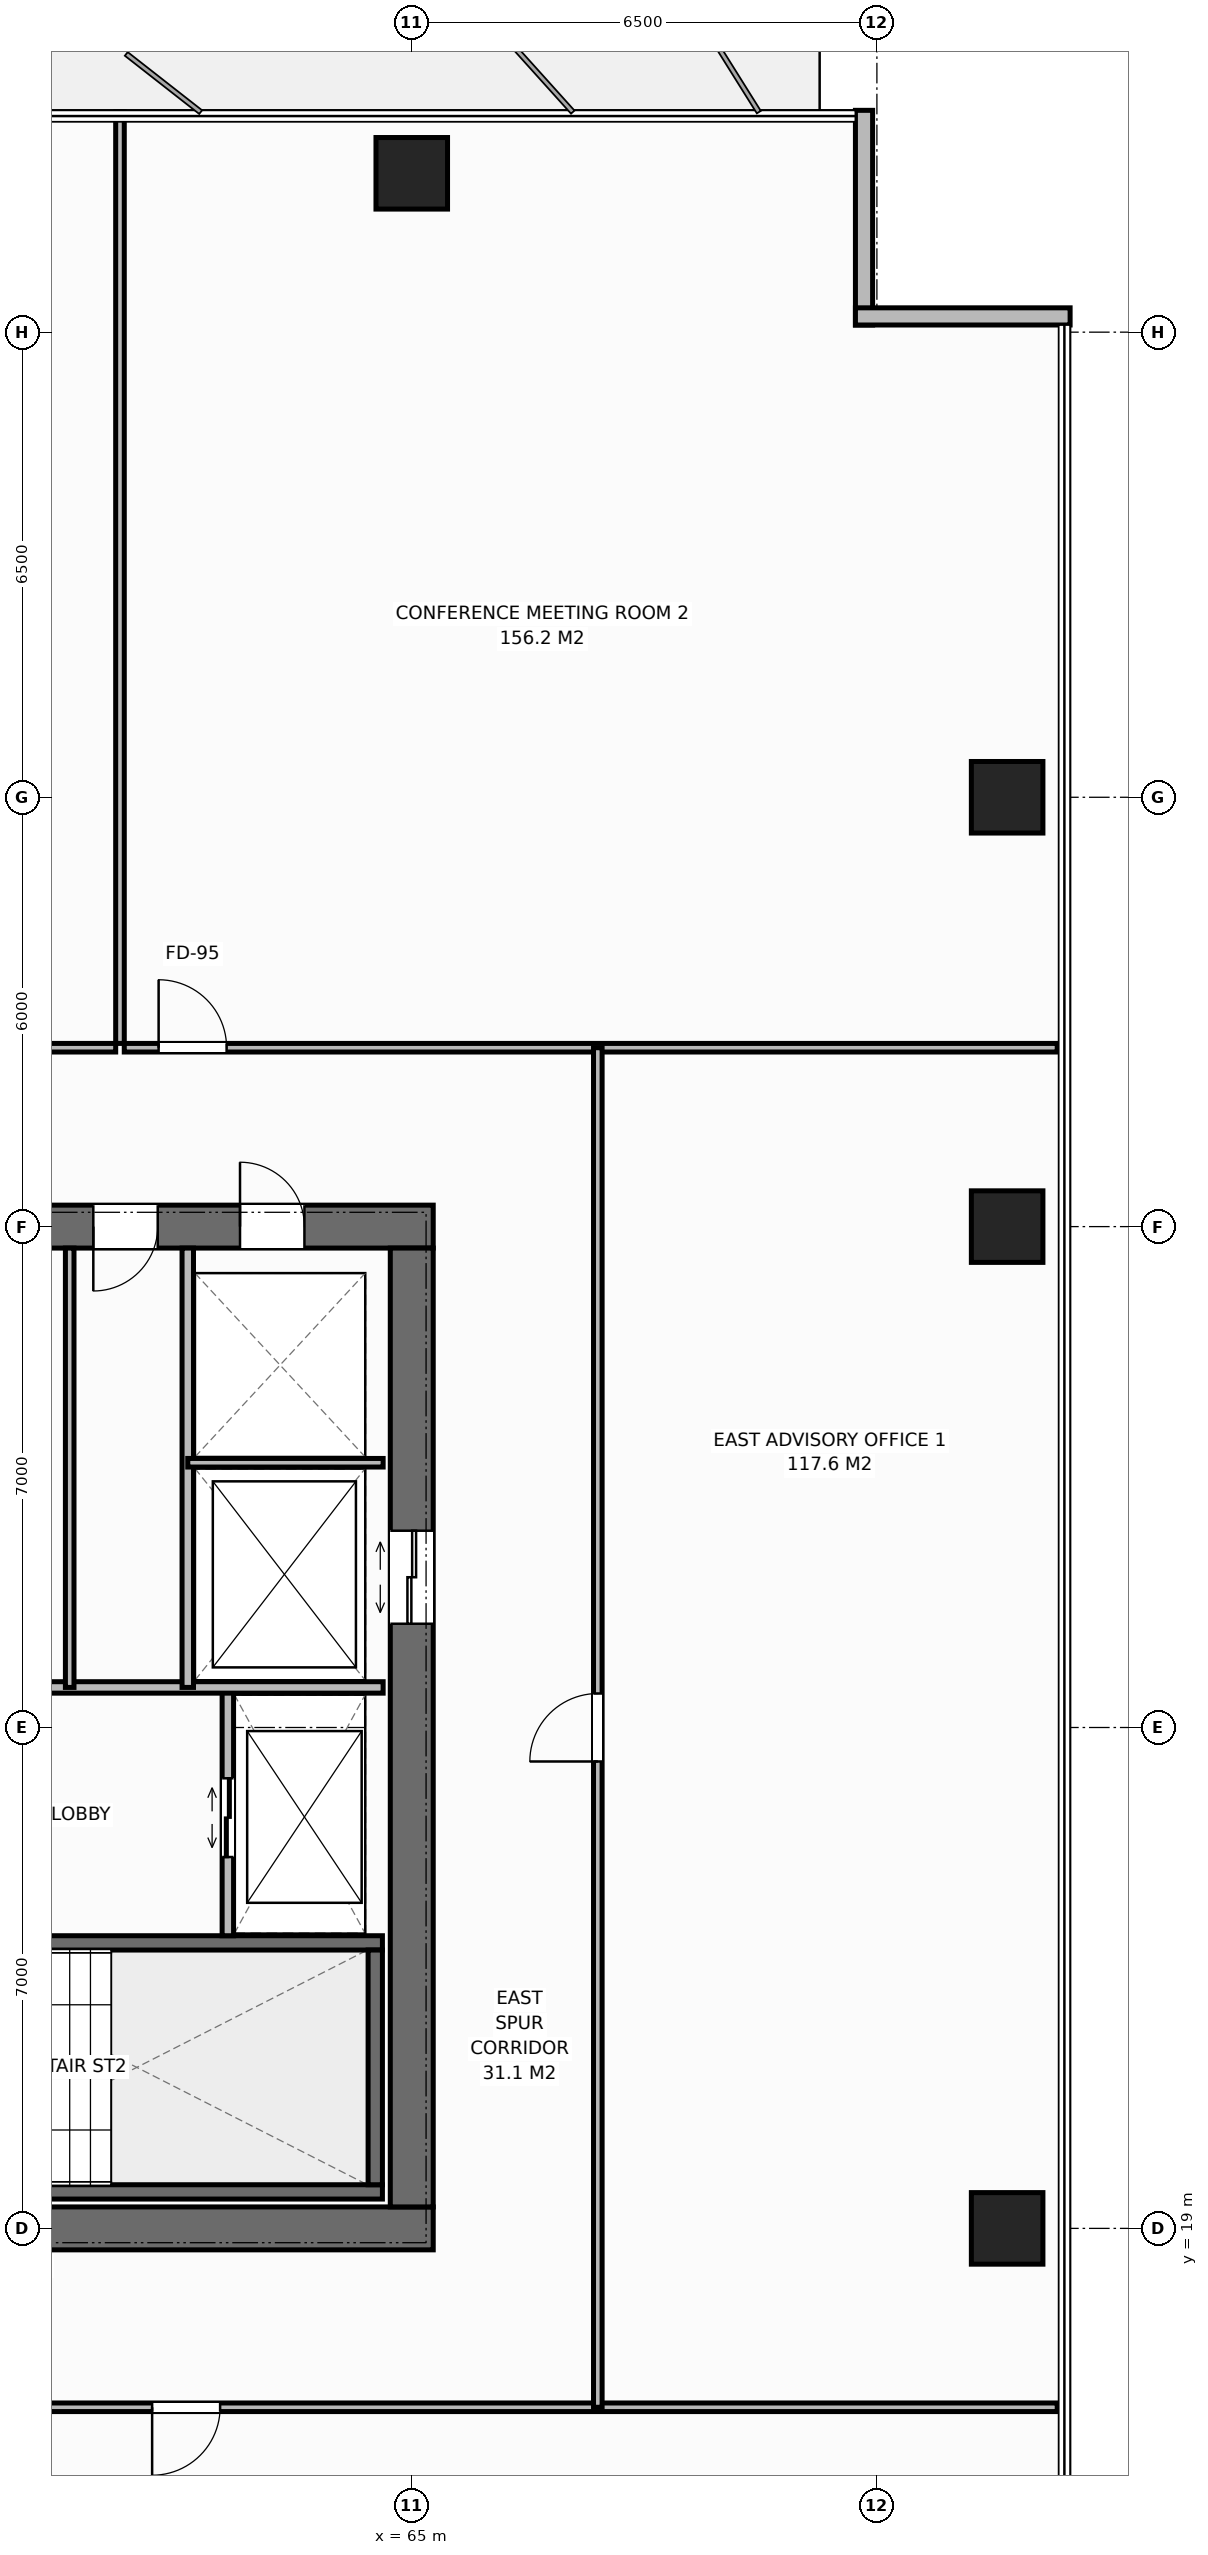
"""IFC4 building model, lengths in metres.
Left out: names, types, materials, properties, quantities, classifications, styles, units other than length and angle.
Written with IfcOpenShell. Run it as: python <this file> out.ifc"""

import sys

from ifc_helpers import new_model, si_unit, direction, frame, frame_2d, origin, origin_2d, place, context, subcontext, project, spatial, rectangle, extrude, element, fill, save


model = new_model("IFC4")
c1 = context("Model", 3, precision=1e-05, world=origin(), true_north=direction((0.0, 1.0)))
c2 = subcontext(c1, "Body", "Model", "MODEL_VIEW")
j1 = project(units=[si_unit("LENGTHUNIT", "METRE"), si_unit("PLANEANGLEUNIT", "RADIAN")], contexts=[c1])
p1 = place(None, origin())
s1 = spatial("IfcSite", under=j1, at=p1, CompositionType="ELEMENT")
p2 = place(p1, origin())
s2 = spatial("IfcBuilding", under=s1, at=p2, CompositionType="ELEMENT")
p3 = place(p2, frame((0.0, 0.0, 144.2)))
s3 = spatial("IfcBuildingStorey", under=s2, at=p3, CompositionType="ELEMENT", Elevation=144.2)
p4 = place(p3, frame((51.7, 19.0, 0.0), z_axis=(0.0, 0.0, 1.0), x_axis=(1.0, 0.0, 0.0)))
e1 = element("IfcWall", 1, at=p4, inside=s3, PredefinedType="SHEAR", context=c2, shape_type="SweptSolid", body=[
    extrude(rectangle(XDim=13.6, YDim=0.6, at=frame_2d((6.8, 0.0))), origin(), (0.0, 0.0, 1.0), 3.8),
])
p5 = place(p4, frame((3.02, 0.0, 0.0)))
e2 = element("IfcOpeningElement", 2, at=p5, cuts=e1, PredefinedType="OPENING", context=c2, shape_type="SweptSolid", body=[
    extrude(rectangle(XDim=1.4, YDim=2.2, at=frame_2d((0.7, 1.1))), frame((0.0, 0.31, 0.0), z_axis=(0.0, -1.0, 0.0), x_axis=(1.0, 0.0, 0.0)), (0.0, 0.0, 1.0), 0.62),
])
p6 = place(p3, frame((51.7, 33.0, 0.0), z_axis=(0.0, 0.0, 1.0), x_axis=(1.0, 0.0, 0.0)))
e3 = element("IfcWall", 3, at=p6, inside=s3, PredefinedType="SHEAR", context=c2, shape_type="SweptSolid", body=[
    extrude(rectangle(XDim=13.6, YDim=0.6, at=frame_2d((6.8, 0.0))), origin(), (0.0, 0.0, 1.0), 3.8),
])
p7 = place(p6, frame((3.02, 0.0, 0.0)))
e4 = element("IfcOpeningElement", 4, at=p7, cuts=e3, PredefinedType="OPENING", context=c2, shape_type="SweptSolid", body=[
    extrude(rectangle(XDim=1.4, YDim=2.2, at=frame_2d((0.7, 1.1))), frame((0.0, 0.31, 0.0), z_axis=(0.0, -1.0, 0.0), x_axis=(1.0, 0.0, 0.0)), (0.0, 0.0, 1.0), 0.62),
])
p8 = place(p6, frame((10.9, 0.0, 0.0)))
e5 = element("IfcOpeningElement", 5, at=p8, cuts=e3, PredefinedType="OPENING", context=c2, shape_type="SweptSolid", body=[
    extrude(rectangle(XDim=0.9, YDim=2.15, at=frame_2d((0.45, 1.075))), frame((0.0, 0.31, 0.0), z_axis=(0.0, -1.0, 0.0), x_axis=(1.0, 0.0, 0.0)), (0.0, 0.0, 1.0), 0.62),
])
p9 = place(p6, frame((5.65, 0.0, 0.0)))
e6 = element("IfcOpeningElement", 6, at=p9, cuts=e3, PredefinedType="OPENING", context=c2, shape_type="SweptSolid", body=[
    extrude(rectangle(XDim=0.9, YDim=2.15, at=frame_2d((0.45, 1.075))), frame((0.0, 0.31, 0.0), z_axis=(0.0, -1.0, 0.0), x_axis=(1.0, 0.0, 0.0)), (0.0, 0.0, 1.0), 0.62),
])
p10 = place(p6, frame((7.25, 0.0, 0.0)))
e7 = element("IfcOpeningElement", 7, at=p10, cuts=e3, PredefinedType="OPENING", context=c2, shape_type="SweptSolid", body=[
    extrude(rectangle(XDim=0.9, YDim=2.15, at=frame_2d((0.45, 1.075))), frame((0.0, 0.31, 0.0), z_axis=(0.0, -1.0, 0.0), x_axis=(1.0, 0.0, 0.0)), (0.0, 0.0, 1.0), 0.62),
])
p11 = place(p6, frame((8.85, 0.0, 0.0)))
e8 = element("IfcOpeningElement", 8, at=p11, cuts=e3, PredefinedType="OPENING", context=c2, shape_type="SweptSolid", body=[
    extrude(rectangle(XDim=0.9, YDim=2.15, at=frame_2d((0.45, 1.075))), frame((0.0, 0.31, 0.0), z_axis=(0.0, -1.0, 0.0), x_axis=(1.0, 0.0, 0.0)), (0.0, 0.0, 1.0), 0.62),
])
p12 = place(p3, frame((65.0, 19.3, 0.0), z_axis=(0.0, 0.0, 1.0), x_axis=(0.0, 1.0, 0.0)))
e9 = element("IfcWall", 9, at=p12, inside=s3, PredefinedType="SHEAR", context=c2, shape_type="SweptSolid", body=[
    extrude(rectangle(XDim=13.4, YDim=0.6, at=frame_2d((6.7, 0.0))), origin(), (0.0, 0.0, 1.0), 3.8),
])
p13 = place(p12, frame((8.15, 0.0, 0.0)))
e10 = element("IfcOpeningElement", 10, at=p13, cuts=e9, PredefinedType="OPENING", context=c2, shape_type="SweptSolid", body=[
    extrude(rectangle(XDim=1.3, YDim=2.2, at=frame_2d((0.65, 1.1))), frame((0.0, 0.31, 0.0), z_axis=(0.0, -1.0, 0.0), x_axis=(1.0, 0.0, 0.0)), (0.0, 0.0, 1.0), 0.62),
])
p14 = place(p3, frame((56.16, 19.51, 0.0), z_axis=(0.0, 0.0, 1.0), x_axis=(1.0, 0.0, 0.0)))
e11 = element("IfcWall", 11, at=p14, inside=s3, PredefinedType="SHEAR", context=c2, shape_type="SweptSolid", body=[
    extrude(rectangle(XDim=8.43, YDim=0.2, at=frame_2d((4.215, 0.0))), origin(), (0.0, 0.0, 1.0), 3.8),
])
p15 = place(p3, frame((56.16, 22.99, 0.0), z_axis=(0.0, 0.0, 1.0), x_axis=(1.0, 0.0, 0.0)))
e12 = element("IfcWall", 12, at=p15, inside=s3, PredefinedType="SHEAR", context=c2, shape_type="SweptSolid", body=[
    extrude(rectangle(XDim=8.43, YDim=0.2, at=frame_2d((4.215, 0.0))), origin(), (0.0, 0.0, 1.0), 3.8),
])
p16 = place(p15, frame((0.45, 0.0, 0.0)))
e13 = element("IfcOpeningElement", 13, at=p16, cuts=e12, PredefinedType="OPENING", context=c2, shape_type="SweptSolid", body=[
    extrude(rectangle(XDim=1.0, YDim=2.15, at=frame_2d((0.5, 1.075))), frame((0.0, 0.11, 0.0), z_axis=(0.0, -1.0, 0.0), x_axis=(1.0, 0.0, 0.0)), (0.0, 0.0, 1.0), 0.22),
])
p17 = place(p3, frame((64.49, 19.61, 0.0), z_axis=(0.0, 0.0, 1.0), x_axis=(0.0, 1.0, 0.0)))
e14 = element("IfcWall", 14, at=p17, inside=s3, PredefinedType="SHEAR", context=c2, shape_type="SweptSolid", body=[
    extrude(rectangle(XDim=3.28, YDim=0.2, at=frame_2d((1.64, 0.0))), origin(), (0.0, 0.0, 1.0), 3.8),
])
for number, where, z_axis, x_axis in (
    (15, (65.0, 47.72, 0.0), (0.0, 0.0, 1.0), (1.0, 0.0, 0.0)),
    (16, (73.32, 19.0, 0.0), (0.0, 0.0, 1.0), (1.0, 0.0, 0.0)),
    (17, (73.32, 33.0, 0.0), (0.0, 0.0, 1.0), (1.0, 0.0, 0.0)),
    (18, (73.32, 39.0, 0.0), (0.0, 0.0, 1.0), (1.0, 0.0, 0.0)),
):
    element("IfcColumn", number, at=place(p3, frame(where, z_axis=z_axis, x_axis=x_axis)), inside=s3, PredefinedType="COLUMN", context=c2, shape_type="SweptSolid", body=[
        extrude(rectangle(XDim=1.0, YDim=1.0, at=origin_2d()), origin(), (0.0, 0.0, 1.0), 3.8),
    ])
for number, where, z_axis, x_axis in (
    (19, (71.32, 48.6, 0.0), (0.0, 0.0, 1.0), (0.0, -1.0, 0.0)),
    (20, (71.2, 45.72, 0.0), (0.0, 0.0, 1.0), (1.0, 0.0, 0.0)),
):
    element("IfcWall", number, at=place(p3, frame(where, z_axis=z_axis, x_axis=x_axis)), inside=s3, PredefinedType="STANDARD", context=c2, shape_type="SweptSolid", body=[
        extrude(rectangle(XDim=3.0, YDim=0.24, at=frame_2d((1.5, 0.0))), origin(), (0.0, 0.0, 1.0), 3.572),
    ])
p18 = place(p3, frame((62.43, 23.09, 0.0), z_axis=(0.0, 0.0, 1.0), x_axis=(0.0, 1.0, 0.0)))
e21 = element("IfcWall", 21, at=p18, inside=s3, PredefinedType="STANDARD", context=c2, shape_type="SweptSolid", body=[
    extrude(rectangle(XDim=3.47, YDim=0.16, at=frame_2d((1.735, 0.0))), origin(), (0.0, 0.0, 1.0), 3.572),
])
p19 = place(p18, frame((1.1, 0.0, 0.0)))
e22 = element("IfcOpeningElement", 22, at=p19, cuts=e21, PredefinedType="OPENING", context=c2, shape_type="SweptSolid", body=[
    extrude(rectangle(XDim=1.1, YDim=2.2, at=frame_2d((0.55, 1.1))), frame((0.0, 0.09, 0.0), z_axis=(0.0, -1.0, 0.0), x_axis=(1.0, 0.0, 0.0)), (0.0, 0.0, 1.0), 0.18),
])
p20 = place(p3, frame((56.26, 26.56, 0.0), z_axis=(0.0, 0.0, 1.0), x_axis=(1.0, 0.0, 0.0)))
e23 = element("IfcWall", 23, at=p20, inside=s3, PredefinedType="STANDARD", context=c2, shape_type="SweptSolid", body=[
    extrude(rectangle(XDim=8.34, YDim=0.16, at=frame_2d((4.17, 0.0))), origin(), (0.0, 0.0, 1.0), 3.572),
])
p21 = place(p3, frame((61.87, 26.56, 0.0), z_axis=(0.0, 0.0, 1.0), x_axis=(0.0, 1.0, 0.0)))
e24 = element("IfcWall", 24, at=p21, inside=s3, PredefinedType="STANDARD", context=c2, shape_type="SweptSolid", body=[
    extrude(rectangle(XDim=6.14, YDim=0.16, at=frame_2d((3.07, 0.0))), origin(), (0.0, 0.0, 1.0), 3.572),
])
p22 = place(p3, frame((61.87, 29.7, 0.0), z_axis=(0.0, 0.0, 1.0), x_axis=(1.0, 0.0, 0.0)))
e25 = element("IfcWall", 25, at=p22, inside=s3, PredefinedType="PARTITIONING", context=c2, shape_type="SweptSolid", body=[
    extrude(rectangle(XDim=2.73, YDim=0.12, at=frame_2d((1.365, 0.0))), origin(), (0.0, 0.0, 1.0), 3.572),
])
p23 = place(p3, frame((60.22, 26.56, 0.0), z_axis=(0.0, 0.0, 1.0), x_axis=(0.0, 1.0, 0.0)))
e26 = element("IfcWall", 26, at=p23, inside=s3, PredefinedType="PARTITIONING", context=c2, shape_type="SweptSolid", body=[
    extrude(rectangle(XDim=6.14, YDim=0.12, at=frame_2d((3.07, 0.0))), origin(), (0.0, 0.0, 1.0), 3.572),
])
p24 = place(p3, frame((60.923, 35.56, 0.0), z_axis=(0.0, 0.0, 1.0), x_axis=(0.0, 1.0, 0.0)))
e27 = element("IfcWall", 27, at=p24, inside=s3, PredefinedType="PARTITIONING", context=c2, shape_type="SweptSolid", body=[
    extrude(rectangle(XDim=13.02, YDim=0.12, at=frame_2d((6.51, 0.0))), origin(), (0.0, 0.0, 1.0), 3.572),
])
p25 = place(p3, frame((52.357, 35.5, 0.0), z_axis=(0.0, 0.0, 1.0), x_axis=(1.0, 0.0, 0.0)))
e28 = element("IfcWall", 28, at=p25, inside=s3, PredefinedType="PARTITIONING", context=c2, shape_type="SweptSolid", body=[
    extrude(rectangle(XDim=8.505, YDim=0.12, at=frame_2d((4.252, 0.0))), origin(), (0.0, 0.0, 1.0), 3.572),
])
p26 = place(p25, frame((3.778, 0.0, 0.0)))
e29 = element("IfcOpeningElement", 29, at=p26, cuts=e28, PredefinedType="OPENING", context=c2, shape_type="SweptSolid", body=[
    extrude(rectangle(XDim=0.95, YDim=2.15, at=frame_2d((0.475, 1.075))), frame((0.0, 0.07, 0.0), z_axis=(0.0, -1.0, 0.0), x_axis=(1.0, 0.0, 0.0)), (0.0, 0.0, 1.0), 0.14),
])
p27 = place(p3, frame((60.983, 35.5, 0.0), z_axis=(0.0, 0.0, 1.0), x_axis=(1.0, 0.0, 0.0)))
e30 = element("IfcWall", 30, at=p27, inside=s3, PredefinedType="PARTITIONING", context=c2, shape_type="SweptSolid", body=[
    extrude(rectangle(XDim=13.037, YDim=0.12, at=frame_2d((6.519, 0.0))), origin(), (0.0, 0.0, 1.0), 3.572),
])
p28 = place(p27, frame((0.48, 0.0, 0.0)))
e31 = element("IfcOpeningElement", 31, at=p28, cuts=e30, PredefinedType="OPENING", context=c2, shape_type="SweptSolid", body=[
    extrude(rectangle(XDim=0.95, YDim=2.15, at=frame_2d((0.475, 1.075))), frame((0.0, 0.07, 0.0), z_axis=(0.0, -1.0, 0.0), x_axis=(1.0, 0.0, 0.0)), (0.0, 0.0, 1.0), 0.14),
])
p29 = place(p3, frame((56.094, 16.5, 0.0), z_axis=(0.0, 0.0, 1.0), x_axis=(1.0, 0.0, 0.0)))
e32 = element("IfcWall", 32, at=p29, inside=s3, PredefinedType="PARTITIONING", context=c2, shape_type="SweptSolid", body=[
    extrude(rectangle(XDim=17.926, YDim=0.12, at=frame_2d((8.963, 0.0))), origin(), (0.0, 0.0, 1.0), 3.572),
])
p30 = place(p29, frame((5.278, 0.0, 0.0)))
e33 = element("IfcOpeningElement", 33, at=p30, cuts=e32, PredefinedType="OPENING", context=c2, shape_type="SweptSolid", body=[
    extrude(rectangle(XDim=0.95, YDim=2.15, at=frame_2d((0.475, 1.075))), frame((0.0, 0.07, 0.0), z_axis=(0.0, -1.0, 0.0), x_axis=(1.0, 0.0, 0.0)), (0.0, 0.0, 1.0), 0.14),
])
p31 = place(p3, frame((67.6, 16.5, 0.0), z_axis=(0.0, 0.0, 1.0), x_axis=(0.0, 1.0, 0.0)))
e34 = element("IfcWall", 34, at=p31, inside=s3, PredefinedType="PARTITIONING", context=c2, shape_type="SweptSolid", body=[
    extrude(rectangle(XDim=19.0, YDim=0.12, at=frame_2d((9.5, 0.0))), origin(), (0.0, 0.0, 1.0), 3.572),
])
p32 = place(p31, frame((9.025, 0.0, 0.0)))
e35 = element("IfcOpeningElement", 35, at=p32, cuts=e34, PredefinedType="OPENING", context=c2, shape_type="SweptSolid", body=[
    extrude(rectangle(XDim=0.95, YDim=2.15, at=frame_2d((0.475, 1.075))), frame((0.0, 0.07, 0.0), z_axis=(0.0, -1.0, 0.0), x_axis=(1.0, 0.0, 0.0)), (0.0, 0.0, 1.0), 0.14),
])
p33 = place(p19, origin())
e36 = element("IfcDoor", 36, at=p33, inside=s3, OperationType="DOUBLE_DOOR_SLIDING", PredefinedType="DOOR", context=c2, shape_type="SweptSolid", body=[
    extrude(rectangle(XDim=1.1, YDim=2.2, at=frame_2d((0.55, 1.1))), frame((0.0, 0.025, 0.0), z_axis=(0.0, -1.0, 0.0), x_axis=(1.0, 0.0, 0.0)), (0.0, 0.0, 1.0), 0.05),
])
fill(e22, e36)
p34 = place(p13, origin())
e37 = element("IfcDoor", 37, at=p34, inside=s3, OperationType="DOUBLE_DOOR_SLIDING", PredefinedType="DOOR", context=c2, shape_type="SweptSolid", body=[
    extrude(rectangle(XDim=1.3, YDim=2.2, at=frame_2d((0.65, 1.1))), frame((0.0, 0.025, 0.0), z_axis=(0.0, -1.0, 0.0), x_axis=(1.0, 0.0, 0.0)), (0.0, 0.0, 1.0), 0.05),
])
fill(e10, e37)
p35 = place(p8, origin())
e38 = element("IfcDoor", 38, at=p35, inside=s3, OperationType="SINGLE_SWING_LEFT", PredefinedType="DOOR", context=c2, shape_type="SweptSolid", body=[
    extrude(rectangle(XDim=0.9, YDim=2.15, at=frame_2d((0.45, 1.075))), frame((0.0, -0.025, 0.0), z_axis=(0.0, -1.0, 0.0), x_axis=(1.0, 0.0, 0.0)), (0.0, 0.0, 1.0), 0.05),
])
fill(e5, e38)
p36 = place(p11, origin())
e39 = element("IfcDoor", 39, at=p36, inside=s3, OperationType="SINGLE_SWING_RIGHT", PredefinedType="DOOR", context=c2, shape_type="SweptSolid", body=[
    extrude(rectangle(XDim=0.9, YDim=2.15, at=frame_2d((0.45, 1.075))), frame((0.0, -0.025, 0.0), z_axis=(0.0, -1.0, 0.0), x_axis=(1.0, 0.0, 0.0)), (0.0, 0.0, 1.0), 0.05),
])
fill(e8, e39)
p37 = place(p28, origin())
e40 = element("IfcDoor", 40, at=p37, inside=s3, OperationType="SINGLE_SWING_LEFT", PredefinedType="DOOR", context=c2, shape_type="SweptSolid", body=[
    extrude(rectangle(XDim=0.95, YDim=2.15, at=frame_2d((0.475, 1.075))), frame((0.0, 0.025, 0.0), z_axis=(0.0, -1.0, 0.0), x_axis=(1.0, 0.0, 0.0)), (0.0, 0.0, 1.0), 0.05),
])
fill(e31, e40)
p38 = place(p30, origin())
e41 = element("IfcDoor", 41, at=p38, inside=s3, OperationType="SINGLE_SWING_RIGHT", PredefinedType="DOOR", context=c2, shape_type="SweptSolid", body=[
    extrude(rectangle(XDim=0.95, YDim=2.15, at=frame_2d((0.475, 1.075))), frame((0.0, 0.025, 0.0), z_axis=(0.0, -1.0, 0.0), x_axis=(1.0, 0.0, 0.0)), (0.0, 0.0, 1.0), 0.05),
])
fill(e33, e41)
p39 = place(p32, origin())
e42 = element("IfcDoor", 42, at=p39, inside=s3, OperationType="SINGLE_SWING_LEFT", PredefinedType="DOOR", context=c2, shape_type="SweptSolid", body=[
    extrude(rectangle(XDim=0.95, YDim=2.15, at=frame_2d((0.475, 1.075))), frame((0.0, 0.025, 0.0), z_axis=(0.0, -1.0, 0.0), x_axis=(1.0, 0.0, 0.0)), (0.0, 0.0, 1.0), 0.05),
])
fill(e35, e42)
save(model, sys.argv[1])
